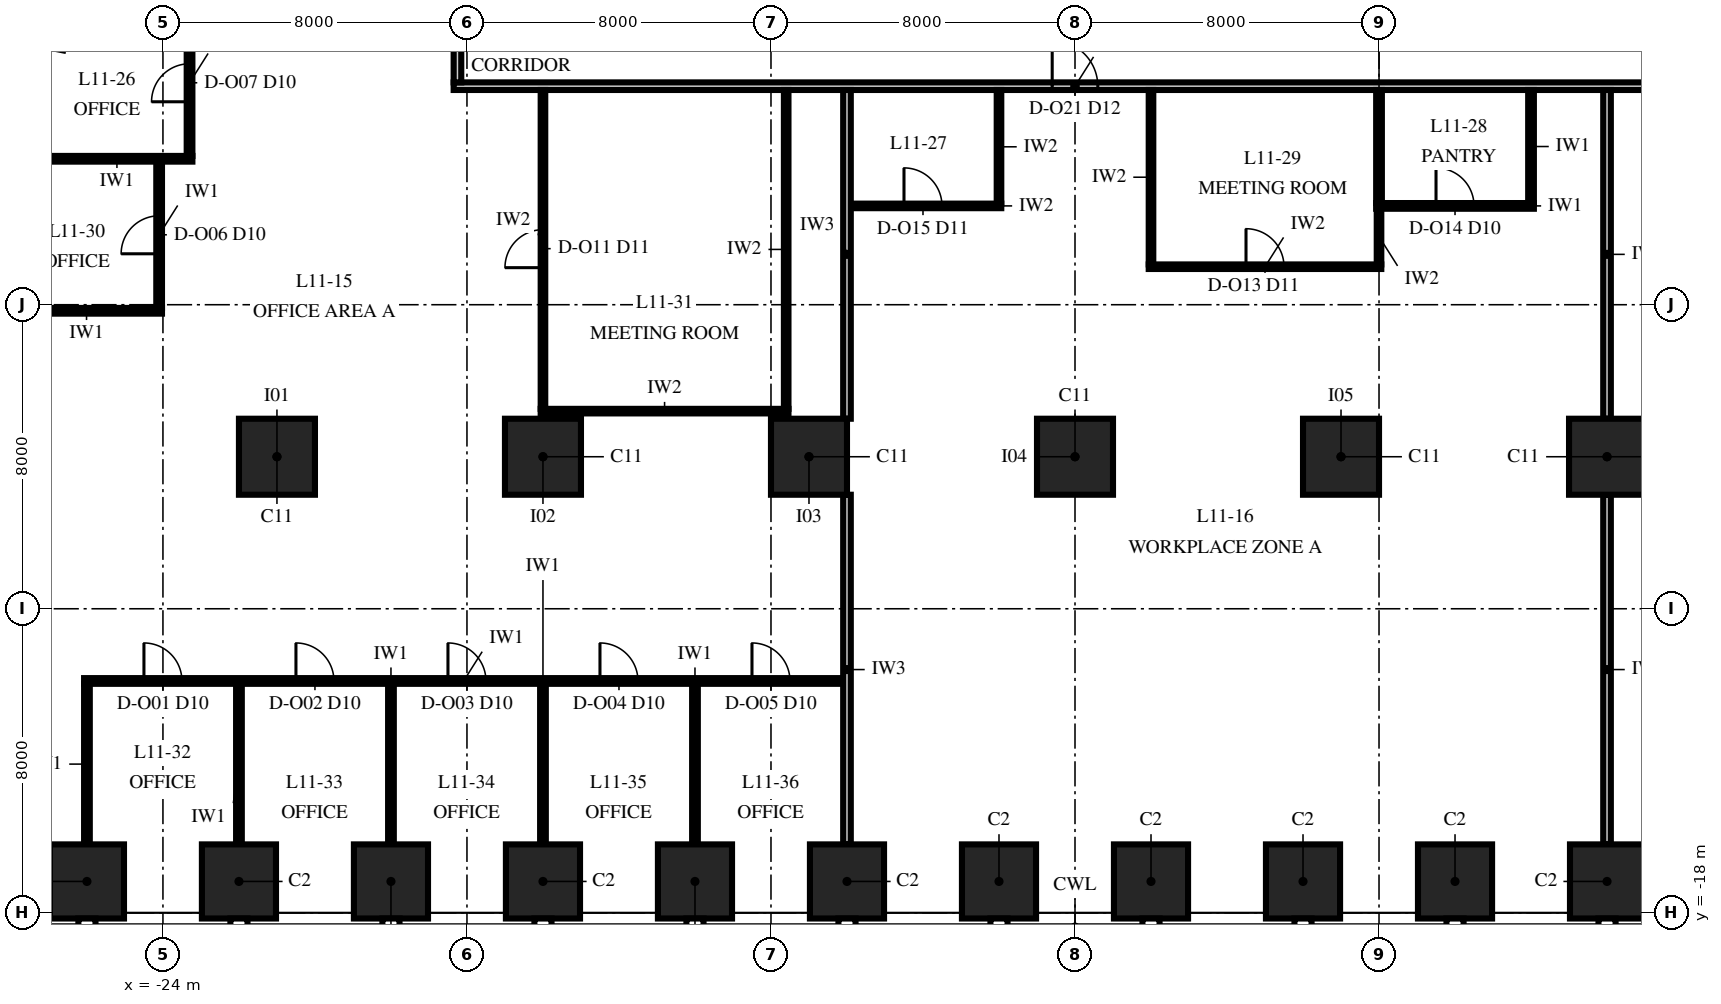
"""IFC4 building model, lengths in metres.
Left out: names, types, materials, properties, quantities, classifications, styles, units other than length and angle.
Written with IfcOpenShell. Run it as: python <this file> out.ifc"""

import sys

from ifc_helpers import new_model, si_unit, direction, frame, frame_2d, origin, origin_2d, place, context, subcontext, project, spatial, rectangle, extrude, element, fill, save


model = new_model("IFC4")
c1 = context("Model", 3, precision=1e-05, world=origin(), true_north=direction((0.0, 1.0)))
c2 = subcontext(c1, "Body", "Model", "MODEL_VIEW")
j1 = project(units=[si_unit("LENGTHUNIT", "METRE"), si_unit("PLANEANGLEUNIT", "RADIAN")], contexts=[c1])
p1 = place(None, origin())
s1 = spatial("IfcSite", under=j1, at=p1, CompositionType="ELEMENT")
p2 = place(p1, origin())
s2 = spatial("IfcBuilding", under=s1, at=p2, CompositionType="ELEMENT")
p3 = place(p2, frame((0.0, 0.0, 56.0)))
s3 = spatial("IfcBuildingStorey", under=s2, at=p3, CompositionType="ELEMENT", Elevation=56.0)
for number, where, z_axis, x_axis in (
    (1, (-26.0, -17.175, 0.0), (0.0, 0.0, 1.0), (1.0, 0.0, 0.0)),
    (2, (-22.0, -17.175, 0.0), (0.0, 0.0, 1.0), (1.0, 0.0, 0.0)),
    (3, (-18.0, -17.175, 0.0), (0.0, 0.0, 1.0), (1.0, 0.0, 0.0)),
    (4, (-14.0, -17.175, 0.0), (0.0, 0.0, 1.0), (1.0, 0.0, 0.0)),
    (5, (-10.0, -17.175, 0.0), (0.0, 0.0, 1.0), (1.0, 0.0, 0.0)),
    (6, (-6.0, -17.175, 0.0), (0.0, 0.0, 1.0), (1.0, 0.0, 0.0)),
    (7, (-2.0, -17.175, 0.0), (0.0, 0.0, 1.0), (1.0, 0.0, 0.0)),
    (8, (2.0, -17.175, 0.0), (0.0, 0.0, 1.0), (1.0, 0.0, 0.0)),
    (9, (6.0, -17.175, 0.0), (0.0, 0.0, 1.0), (1.0, 0.0, 0.0)),
    (10, (10.0, -17.175, 0.0), (0.0, 0.0, 1.0), (1.0, 0.0, 0.0)),
    (11, (14.0, -17.175, 0.0), (0.0, 0.0, 1.0), (1.0, 0.0, 0.0)),
):
    element("IfcColumn", number, at=place(p3, frame(where, z_axis=z_axis, x_axis=x_axis)), inside=s3, PredefinedType="COLUMN", context=c2, shape_type="SweptSolid", body=[
        extrude(rectangle(XDim=1.95, YDim=1.95, at=origin_2d()), origin(), (0.0, 0.0, 1.0), 4.0),
    ])
for number, where, z_axis, x_axis in (
    (12, (-21.0, -6.0, 0.0), (0.0, 0.0, 1.0), (1.0, 0.0, 0.0)),
    (13, (-14.0, -6.0, 0.0), (0.0, 0.0, 1.0), (1.0, 0.0, 0.0)),
    (14, (-7.0, -6.0, 0.0), (0.0, 0.0, 1.0), (1.0, 0.0, 0.0)),
    (15, (0.0, -6.0, 0.0), (0.0, 0.0, 1.0), (1.0, 0.0, 0.0)),
    (16, (7.0, -6.0, 0.0), (0.0, 0.0, 1.0), (1.0, 0.0, 0.0)),
    (17, (14.0, -6.0, 0.0), (0.0, 0.0, 1.0), (1.0, 0.0, 0.0)),
):
    element("IfcColumn", number, at=place(p3, frame(where, z_axis=z_axis, x_axis=x_axis)), inside=s3, PredefinedType="COLUMN", context=c2, shape_type="SweptSolid", body=[
        extrude(rectangle(XDim=2.0, YDim=2.0, at=origin_2d()), origin(), (0.0, 0.0, 1.0), 4.0),
    ])
p4 = place(p3, frame((-26.075, -11.9, 0.0), z_axis=(0.0, 0.0, 1.0), x_axis=(1.0, 0.0, 0.0)))
e18 = element("IfcWall", 18, at=p4, inside=s3, PredefinedType="PARTITIONING", context=c2, shape_type="SweptSolid", body=[
    extrude(rectangle(XDim=19.975, YDim=0.15, at=frame_2d((9.987, 0.0))), origin(), (0.0, 0.0, 1.0), 3.25),
])
p5 = place(p4, frame((1.575, 0.0, 0.0)))
e19 = element("IfcOpeningElement", 19, at=p5, cuts=e18, PredefinedType="OPENING", context=c2, shape_type="SweptSolid", body=[
    extrude(rectangle(XDim=1.0, YDim=2.3, at=frame_2d((0.5, 1.15))), frame((0.0, 0.09, 0.0), z_axis=(0.0, -1.0, 0.0), x_axis=(1.0, 0.0, 0.0)), (0.0, 0.0, 1.0), 0.18),
])
p6 = place(p4, frame((5.575, 0.0, 0.0)))
e20 = element("IfcOpeningElement", 20, at=p6, cuts=e18, PredefinedType="OPENING", context=c2, shape_type="SweptSolid", body=[
    extrude(rectangle(XDim=1.0, YDim=2.3, at=frame_2d((0.5, 1.15))), frame((0.0, 0.09, 0.0), z_axis=(0.0, -1.0, 0.0), x_axis=(1.0, 0.0, 0.0)), (0.0, 0.0, 1.0), 0.18),
])
p7 = place(p4, frame((9.575, 0.0, 0.0)))
e21 = element("IfcOpeningElement", 21, at=p7, cuts=e18, PredefinedType="OPENING", context=c2, shape_type="SweptSolid", body=[
    extrude(rectangle(XDim=1.0, YDim=2.3, at=frame_2d((0.5, 1.15))), frame((0.0, 0.09, 0.0), z_axis=(0.0, -1.0, 0.0), x_axis=(1.0, 0.0, 0.0)), (0.0, 0.0, 1.0), 0.18),
])
p8 = place(p4, frame((13.575, 0.0, 0.0)))
e22 = element("IfcOpeningElement", 22, at=p8, cuts=e18, PredefinedType="OPENING", context=c2, shape_type="SweptSolid", body=[
    extrude(rectangle(XDim=1.0, YDim=2.3, at=frame_2d((0.5, 1.15))), frame((0.0, 0.09, 0.0), z_axis=(0.0, -1.0, 0.0), x_axis=(1.0, 0.0, 0.0)), (0.0, 0.0, 1.0), 0.18),
])
p9 = place(p4, frame((17.575, 0.0, 0.0)))
e23 = element("IfcOpeningElement", 23, at=p9, cuts=e18, PredefinedType="OPENING", context=c2, shape_type="SweptSolid", body=[
    extrude(rectangle(XDim=1.0, YDim=2.3, at=frame_2d((0.5, 1.15))), frame((0.0, 0.09, 0.0), z_axis=(0.0, -1.0, 0.0), x_axis=(1.0, 0.0, 0.0)), (0.0, 0.0, 1.0), 0.18),
])
p10 = place(p3, frame((-14.06, -4.8, 0.0), z_axis=(0.0, 0.0, 1.0), x_axis=(1.0, 0.0, 0.0)))
e24 = element("IfcWall", 24, at=p10, inside=s3, PredefinedType="PARTITIONING", context=c2, shape_type="SweptSolid", body=[
    extrude(rectangle(XDim=6.52, YDim=0.12, at=frame_2d((3.26, 0.0))), origin(), (0.0, 0.0, 1.0), 3.25),
])
p11 = place(p3, frame((-27.996, -2.16, 0.0), z_axis=(0.0, 0.0, 1.0), x_axis=(1.0, 0.0, 0.0)))
e25 = element("IfcWall", 25, at=p11, inside=s3, PredefinedType="PARTITIONING", context=c2, shape_type="SweptSolid", body=[
    extrude(rectangle(XDim=3.971, YDim=0.15, at=frame_2d((1.986, 0.0))), origin(), (0.0, 0.0, 1.0), 3.25),
])
p12 = place(p3, frame((1.94, -1.0, 0.0), z_axis=(0.0, 0.0, 1.0), x_axis=(1.0, 0.0, 0.0)))
e26 = element("IfcWall", 26, at=p12, inside=s3, PredefinedType="PARTITIONING", context=c2, shape_type="SweptSolid", body=[
    extrude(rectangle(XDim=6.12, YDim=0.12, at=frame_2d((3.06, 0.0))), origin(), (0.0, 0.0, 1.0), 3.25),
])
p13 = place(p12, frame((2.56, 0.0, 0.0)))
e27 = element("IfcOpeningElement", 27, at=p13, cuts=e26, PredefinedType="OPENING", context=c2, shape_type="SweptSolid", body=[
    extrude(rectangle(XDim=1.0, YDim=2.4, at=frame_2d((0.5, 1.2))), frame((0.0, 0.075, 0.0), z_axis=(0.0, -1.0, 0.0), x_axis=(1.0, 0.0, 0.0)), (0.0, 0.0, 1.0), 0.15),
])
p14 = place(p3, frame((-5.9, 0.6, 0.0), z_axis=(0.0, 0.0, 1.0), x_axis=(1.0, 0.0, 0.0)))
e28 = element("IfcWall", 28, at=p14, inside=s3, PredefinedType="PARTITIONING", context=c2, shape_type="SweptSolid", body=[
    extrude(rectangle(XDim=3.96, YDim=0.12, at=frame_2d((1.98, 0.0))), origin(), (0.0, 0.0, 1.0), 3.25),
])
p15 = place(p14, frame((1.4, 0.0, 0.0)))
e29 = element("IfcOpeningElement", 29, at=p15, cuts=e28, PredefinedType="OPENING", context=c2, shape_type="SweptSolid", body=[
    extrude(rectangle(XDim=1.0, YDim=2.4, at=frame_2d((0.5, 1.2))), frame((0.0, 0.075, 0.0), z_axis=(0.0, -1.0, 0.0), x_axis=(1.0, 0.0, 0.0)), (0.0, 0.0, 1.0), 0.15),
])
p16 = place(p3, frame((7.925, 0.6, 0.0), z_axis=(0.0, 0.0, 1.0), x_axis=(1.0, 0.0, 0.0)))
e30 = element("IfcWall", 30, at=p16, inside=s3, PredefinedType="PARTITIONING", context=c2, shape_type="SweptSolid", body=[
    extrude(rectangle(XDim=4.15, YDim=0.15, at=frame_2d((2.075, 0.0))), origin(), (0.0, 0.0, 1.0), 3.25),
])
p17 = place(p16, frame((1.575, 0.0, 0.0)))
e31 = element("IfcOpeningElement", 31, at=p17, cuts=e30, PredefinedType="OPENING", context=c2, shape_type="SweptSolid", body=[
    extrude(rectangle(XDim=1.0, YDim=2.3, at=frame_2d((0.5, 1.15))), frame((0.0, 0.09, 0.0), z_axis=(0.0, -1.0, 0.0), x_axis=(1.0, 0.0, 0.0)), (0.0, 0.0, 1.0), 0.18),
])
p18 = place(p3, frame((-27.196, 1.84, 0.0), z_axis=(0.0, 0.0, 1.0), x_axis=(1.0, 0.0, 0.0)))
e32 = element("IfcWall", 32, at=p18, inside=s3, PredefinedType="PARTITIONING", context=c2, shape_type="SweptSolid", body=[
    extrude(rectangle(XDim=3.971, YDim=0.15, at=frame_2d((1.986, 0.0))), origin(), (0.0, 0.0, 1.0), 3.25),
])
p19 = place(p3, frame((-16.35, 3.75, 0.0), z_axis=(0.0, 0.0, 1.0), x_axis=(1.0, 0.0, 0.0)))
e33 = element("IfcWall", 33, at=p19, inside=s3, PredefinedType="PARTITIONING", context=c2, shape_type="SweptSolid", body=[
    extrude(rectangle(XDim=32.7, YDim=0.2, at=frame_2d((16.35, 0.0))), origin(), (0.0, 0.0, 1.0), 3.25),
])
p20 = place(p19, frame((15.75, 0.0, 0.0)))
e34 = element("IfcOpeningElement", 34, at=p20, cuts=e33, PredefinedType="OPENING", context=c2, shape_type="SweptSolid", body=[
    extrude(rectangle(XDim=1.2, YDim=2.4, at=frame_2d((0.6, 1.2))), frame((0.0, 0.115, 0.0), z_axis=(0.0, -1.0, 0.0), x_axis=(1.0, 0.0, 0.0)), (0.0, 0.0, 1.0), 0.23),
])
p21 = place(p3, frame((-26.0, -16.2, 0.0), z_axis=(0.0, 0.0, 1.0), x_axis=(0.0, 1.0, 0.0)))
e35 = element("IfcWall", 35, at=p21, inside=s3, PredefinedType="PARTITIONING", context=c2, shape_type="SweptSolid", body=[
    extrude(rectangle(XDim=4.225, YDim=0.15, at=frame_2d((2.112, 0.0))), origin(), (0.0, 0.0, 1.0), 3.25),
])
p22 = place(p3, frame((-24.1, -2.085, 0.0), z_axis=(0.0, 0.0, 1.0), x_axis=(0.0, 1.0, 0.0)))
e36 = element("IfcWall", 36, at=p22, inside=s3, PredefinedType="PARTITIONING", context=c2, shape_type="SweptSolid", body=[
    extrude(rectangle(XDim=3.85, YDim=0.15, at=frame_2d((1.925, 0.0))), origin(), (0.0, 0.0, 1.0), 3.85),
])
p23 = place(p22, frame((1.425, 0.0, 0.0)))
e37 = element("IfcOpeningElement", 37, at=p23, cuts=e36, PredefinedType="OPENING", context=c2, shape_type="SweptSolid", body=[
    extrude(rectangle(XDim=1.0, YDim=2.3, at=frame_2d((0.5, 1.15))), frame((0.0, 0.09, 0.0), z_axis=(0.0, -1.0, 0.0), x_axis=(1.0, 0.0, 0.0)), (0.0, 0.0, 1.0), 0.18),
])
p24 = place(p3, frame((-23.3, 1.915, 0.0), z_axis=(0.0, 0.0, 1.0), x_axis=(0.0, 1.0, 0.0)))
e38 = element("IfcWall", 38, at=p24, inside=s3, PredefinedType="PARTITIONING", context=c2, shape_type="SweptSolid", body=[
    extrude(rectangle(XDim=3.85, YDim=0.15, at=frame_2d((1.925, 0.0))), origin(), (0.0, 0.0, 1.0), 3.85),
])
p25 = place(p24, frame((1.425, 0.0, 0.0)))
e39 = element("IfcOpeningElement", 39, at=p25, cuts=e38, PredefinedType="OPENING", context=c2, shape_type="SweptSolid", body=[
    extrude(rectangle(XDim=1.0, YDim=2.3, at=frame_2d((0.5, 1.15))), frame((0.0, 0.09, 0.0), z_axis=(0.0, -1.0, 0.0), x_axis=(1.0, 0.0, 0.0)), (0.0, 0.0, 1.0), 0.18),
])
for number, where, z_axis, x_axis in (
    (40, (-22.0, -16.2, 0.0), (0.0, 0.0, 1.0), (0.0, 1.0, 0.0)),
    (41, (-18.0, -16.2, 0.0), (0.0, 0.0, 1.0), (0.0, 1.0, 0.0)),
):
    element("IfcWall", number, at=place(p3, frame(where, z_axis=z_axis, x_axis=x_axis)), inside=s3, PredefinedType="PARTITIONING", context=c2, shape_type="SweptSolid", body=[
        extrude(rectangle(XDim=4.225, YDim=0.15, at=frame_2d((2.112, 0.0))), origin(), (0.0, 0.0, 1.0), 3.25),
    ])
p26 = place(p3, frame((-16.25, 3.85, 0.0), z_axis=(0.0, 0.0, 1.0), x_axis=(0.0, 1.0, 0.0)))
e42 = element("IfcWall", 42, at=p26, inside=s3, PredefinedType="PARTITIONING", context=c2, shape_type="SweptSolid", body=[
    extrude(rectangle(XDim=22.3, YDim=0.2, at=frame_2d((11.15, 0.0))), origin(), (0.0, 0.0, 1.0), 2.842),
])
p27 = place(p26, frame((4.55, 0.0, 0.0)))
e43 = element("IfcOpeningElement", 43, at=p27, cuts=e42, PredefinedType="OPENING", context=c2, shape_type="SweptSolid", body=[
    extrude(rectangle(XDim=1.2, YDim=2.4, at=frame_2d((0.6, 1.2))), frame((0.0, 0.115, 0.0), z_axis=(0.0, -1.0, 0.0), x_axis=(1.0, 0.0, 0.0)), (0.0, 0.0, 1.0), 0.23),
])
p28 = place(p3, frame((-14.0, -16.2, 0.0), z_axis=(0.0, 0.0, 1.0), x_axis=(0.0, 1.0, 0.0)))
e44 = element("IfcWall", 44, at=p28, inside=s3, PredefinedType="PARTITIONING", context=c2, shape_type="SweptSolid", body=[
    extrude(rectangle(XDim=4.225, YDim=0.15, at=frame_2d((2.112, 0.0))), origin(), (0.0, 0.0, 1.0), 3.25),
])
p29 = place(p3, frame((-14.0, -4.74, 0.0), z_axis=(0.0, 0.0, 1.0), x_axis=(0.0, 1.0, 0.0)))
e45 = element("IfcWall", 45, at=p29, inside=s3, PredefinedType="PARTITIONING", context=c2, shape_type="SweptSolid", body=[
    extrude(rectangle(XDim=8.39, YDim=0.12, at=frame_2d((4.195, 0.0))), origin(), (0.0, 0.0, 1.0), 3.25),
])
p30 = place(p29, frame((3.715, 0.0, 0.0)))
e46 = element("IfcOpeningElement", 46, at=p30, cuts=e45, PredefinedType="OPENING", context=c2, shape_type="SweptSolid", body=[
    extrude(rectangle(XDim=1.0, YDim=2.4, at=frame_2d((0.5, 1.2))), frame((0.0, 0.075, 0.0), z_axis=(0.0, -1.0, 0.0), x_axis=(1.0, 0.0, 0.0)), (0.0, 0.0, 1.0), 0.15),
])
p31 = place(p3, frame((-10.0, -16.2, 0.0), z_axis=(0.0, 0.0, 1.0), x_axis=(0.0, 1.0, 0.0)))
e47 = element("IfcWall", 47, at=p31, inside=s3, PredefinedType="PARTITIONING", context=c2, shape_type="SweptSolid", body=[
    extrude(rectangle(XDim=4.225, YDim=0.15, at=frame_2d((2.112, 0.0))), origin(), (0.0, 0.0, 1.0), 3.25),
])
p32 = place(p3, frame((-7.6, -4.74, 0.0), z_axis=(0.0, 0.0, 1.0), x_axis=(0.0, 1.0, 0.0)))
e48 = element("IfcWall", 48, at=p32, inside=s3, PredefinedType="PARTITIONING", context=c2, shape_type="SweptSolid", body=[
    extrude(rectangle(XDim=8.39, YDim=0.12, at=frame_2d((4.195, 0.0))), origin(), (0.0, 0.0, 1.0), 3.85),
])
p33 = place(p3, frame((-6.0, -16.2, 0.0), z_axis=(0.0, 0.0, 1.0), x_axis=(0.0, 1.0, 0.0)))
e49 = element("IfcWall", 49, at=p33, inside=s3, PredefinedType="PARTITIONING", context=c2, shape_type="SweptSolid", body=[
    extrude(rectangle(XDim=9.2, YDim=0.2, at=frame_2d((4.6, 0.0))), origin(), (0.0, 0.0, 1.0), 3.25),
])
p34 = place(p3, frame((-6.0, -5.0, 0.0), z_axis=(0.0, 0.0, 1.0), x_axis=(0.0, 1.0, 0.0)))
e50 = element("IfcWall", 50, at=p34, inside=s3, PredefinedType="PARTITIONING", context=c2, shape_type="SweptSolid", body=[
    extrude(rectangle(XDim=8.65, YDim=0.2, at=frame_2d((4.325, 0.0))), origin(), (0.0, 0.0, 1.0), 3.25),
])
p35 = place(p3, frame((-2.0, 0.66, 0.0), z_axis=(0.0, 0.0, 1.0), x_axis=(0.0, 1.0, 0.0)))
e51 = element("IfcWall", 51, at=p35, inside=s3, PredefinedType="PARTITIONING", context=c2, shape_type="SweptSolid", body=[
    extrude(rectangle(XDim=2.99, YDim=0.12, at=frame_2d((1.495, 0.0))), origin(), (0.0, 0.0, 1.0), 3.85),
])
p36 = place(p3, frame((2.0, -0.94, 0.0), z_axis=(0.0, 0.0, 1.0), x_axis=(0.0, 1.0, 0.0)))
e52 = element("IfcWall", 52, at=p36, inside=s3, PredefinedType="PARTITIONING", context=c2, shape_type="SweptSolid", body=[
    extrude(rectangle(XDim=4.59, YDim=0.12, at=frame_2d((2.295, 0.0))), origin(), (0.0, 0.0, 1.0), 3.85),
])
p37 = place(p3, frame((8.0, -0.94, 0.0), z_axis=(0.0, 0.0, 1.0), x_axis=(0.0, 1.0, 0.0)))
e53 = element("IfcWall", 53, at=p37, inside=s3, PredefinedType="PARTITIONING", context=c2, shape_type="SweptSolid", body=[
    extrude(rectangle(XDim=1.465, YDim=0.12, at=frame_2d((0.732, 0.0))), origin(), (0.0, 0.0, 1.0), 3.85),
])
for number, where, z_axis, x_axis in (
    (54, (8.0, 0.675, 0.0), (0.0, 0.0, 1.0), (0.0, 1.0, 0.0)),
    (55, (12.0, 0.675, 0.0), (0.0, 0.0, 1.0), (0.0, 1.0, 0.0)),
):
    element("IfcWall", number, at=place(p3, frame(where, z_axis=z_axis, x_axis=x_axis)), inside=s3, PredefinedType="PARTITIONING", context=c2, shape_type="SweptSolid", body=[
        extrude(rectangle(XDim=2.975, YDim=0.15, at=frame_2d((1.487, 0.0))), origin(), (0.0, 0.0, 1.0), 3.85),
    ])
p38 = place(p3, frame((14.0, -16.2, 0.0), z_axis=(0.0, 0.0, 1.0), x_axis=(0.0, 1.0, 0.0)))
e56 = element("IfcWall", 56, at=p38, inside=s3, PredefinedType="PARTITIONING", context=c2, shape_type="SweptSolid", body=[
    extrude(rectangle(XDim=9.2, YDim=0.2, at=frame_2d((4.6, 0.0))), origin(), (0.0, 0.0, 1.0), 3.25),
])
p39 = place(p3, frame((14.0, -5.0, 0.0), z_axis=(0.0, 0.0, 1.0), x_axis=(0.0, 1.0, 0.0)))
e57 = element("IfcWall", 57, at=p39, inside=s3, PredefinedType="PARTITIONING", context=c2, shape_type="SweptSolid", body=[
    extrude(rectangle(XDim=8.65, YDim=0.2, at=frame_2d((4.325, 0.0))), origin(), (0.0, 0.0, 1.0), 3.25),
])
p40 = place(p5, origin())
e58 = element("IfcDoor", 58, at=p40, inside=s3, OperationType="SINGLE_SWING_LEFT", PredefinedType="DOOR", context=c2, shape_type="SweptSolid", body=[
    extrude(rectangle(XDim=1.0, YDim=2.3, at=frame_2d((0.5, 1.15))), frame((0.0, 0.075, 0.0), z_axis=(0.0, -1.0, 0.0), x_axis=(1.0, 0.0, 0.0)), (0.0, 0.0, 1.0), 0.149),
])
fill(e19, e58)
p41 = place(p6, origin())
e59 = element("IfcDoor", 59, at=p41, inside=s3, OperationType="SINGLE_SWING_LEFT", PredefinedType="DOOR", context=c2, shape_type="SweptSolid", body=[
    extrude(rectangle(XDim=1.0, YDim=2.3, at=frame_2d((0.5, 1.15))), frame((0.0, 0.075, 0.0), z_axis=(0.0, -1.0, 0.0), x_axis=(1.0, 0.0, 0.0)), (0.0, 0.0, 1.0), 0.149),
])
fill(e20, e59)
p42 = place(p7, origin())
e60 = element("IfcDoor", 60, at=p42, inside=s3, OperationType="SINGLE_SWING_LEFT", PredefinedType="DOOR", context=c2, shape_type="SweptSolid", body=[
    extrude(rectangle(XDim=1.0, YDim=2.3, at=frame_2d((0.5, 1.15))), frame((0.0, 0.075, 0.0), z_axis=(0.0, -1.0, 0.0), x_axis=(1.0, 0.0, 0.0)), (0.0, 0.0, 1.0), 0.149),
])
fill(e21, e60)
p43 = place(p8, origin())
e61 = element("IfcDoor", 61, at=p43, inside=s3, OperationType="SINGLE_SWING_LEFT", PredefinedType="DOOR", context=c2, shape_type="SweptSolid", body=[
    extrude(rectangle(XDim=1.0, YDim=2.3, at=frame_2d((0.5, 1.15))), frame((0.0, 0.075, 0.0), z_axis=(0.0, -1.0, 0.0), x_axis=(1.0, 0.0, 0.0)), (0.0, 0.0, 1.0), 0.149),
])
fill(e22, e61)
p44 = place(p9, origin())
e62 = element("IfcDoor", 62, at=p44, inside=s3, OperationType="SINGLE_SWING_LEFT", PredefinedType="DOOR", context=c2, shape_type="SweptSolid", body=[
    extrude(rectangle(XDim=1.0, YDim=2.3, at=frame_2d((0.5, 1.15))), frame((0.0, 0.075, 0.0), z_axis=(0.0, -1.0, 0.0), x_axis=(1.0, 0.0, 0.0)), (0.0, 0.0, 1.0), 0.149),
])
fill(e23, e62)
p45 = place(p23, origin())
e63 = element("IfcDoor", 63, at=p45, inside=s3, OperationType="SINGLE_SWING_LEFT", PredefinedType="DOOR", context=c2, shape_type="SweptSolid", body=[
    extrude(rectangle(XDim=1.0, YDim=2.3, at=frame_2d((0.5, 1.15))), frame((0.0, 0.075, 0.0), z_axis=(0.0, -1.0, 0.0), x_axis=(1.0, 0.0, 0.0)), (0.0, 0.0, 1.0), 0.149),
])
fill(e37, e63)
p46 = place(p25, origin())
e64 = element("IfcDoor", 64, at=p46, inside=s3, OperationType="SINGLE_SWING_LEFT", PredefinedType="DOOR", context=c2, shape_type="SweptSolid", body=[
    extrude(rectangle(XDim=1.0, YDim=2.3, at=frame_2d((0.5, 1.15))), frame((0.0, 0.075, 0.0), z_axis=(0.0, -1.0, 0.0), x_axis=(1.0, 0.0, 0.0)), (0.0, 0.0, 1.0), 0.149),
])
fill(e39, e64)
p47 = place(p30, origin())
e65 = element("IfcDoor", 65, at=p47, inside=s3, OperationType="SINGLE_SWING_RIGHT", PredefinedType="DOOR", context=c2, shape_type="SweptSolid", body=[
    extrude(rectangle(XDim=1.0, YDim=2.4, at=frame_2d((0.5, 1.2))), frame((0.0, 0.06, 0.0), z_axis=(0.0, -1.0, 0.0), x_axis=(1.0, 0.0, 0.0)), (0.0, 0.0, 1.0), 0.12),
])
fill(e46, e65)
p48 = place(p13, origin())
e66 = element("IfcDoor", 66, at=p48, inside=s3, OperationType="SINGLE_SWING_RIGHT", PredefinedType="DOOR", context=c2, shape_type="SweptSolid", body=[
    extrude(rectangle(XDim=1.0, YDim=2.4, at=frame_2d((0.5, 1.2))), frame((0.0, 0.06, 0.0), z_axis=(0.0, -1.0, 0.0), x_axis=(1.0, 0.0, 0.0)), (0.0, 0.0, 1.0), 0.12),
])
fill(e27, e66)
p49 = place(p17, origin())
e67 = element("IfcDoor", 67, at=p49, inside=s3, OperationType="SINGLE_SWING_LEFT", PredefinedType="DOOR", context=c2, shape_type="SweptSolid", body=[
    extrude(rectangle(XDim=1.0, YDim=2.3, at=frame_2d((0.5, 1.15))), frame((0.0, 0.075, 0.0), z_axis=(0.0, -1.0, 0.0), x_axis=(1.0, 0.0, 0.0)), (0.0, 0.0, 1.0), 0.149),
])
fill(e31, e67)
p50 = place(p15, origin())
e68 = element("IfcDoor", 68, at=p50, inside=s3, OperationType="SINGLE_SWING_RIGHT", PredefinedType="DOOR", context=c2, shape_type="SweptSolid", body=[
    extrude(rectangle(XDim=1.0, YDim=2.4, at=frame_2d((0.5, 1.2))), frame((0.0, 0.06, 0.0), z_axis=(0.0, -1.0, 0.0), x_axis=(1.0, 0.0, 0.0)), (0.0, 0.0, 1.0), 0.12),
])
fill(e29, e68)
p51 = place(p20, origin())
e69 = element("IfcDoor", 69, at=p51, inside=s3, OperationType="SINGLE_SWING_LEFT", PredefinedType="DOOR", context=c2, shape_type="SweptSolid", body=[
    extrude(rectangle(XDim=1.2, YDim=2.4, at=frame_2d((0.6, 1.2))), frame((0.0, 0.1, 0.0), z_axis=(0.0, -1.0, 0.0), x_axis=(1.0, 0.0, 0.0)), (0.0, 0.0, 1.0), 0.199),
])
fill(e34, e69)
save(model, sys.argv[1])
